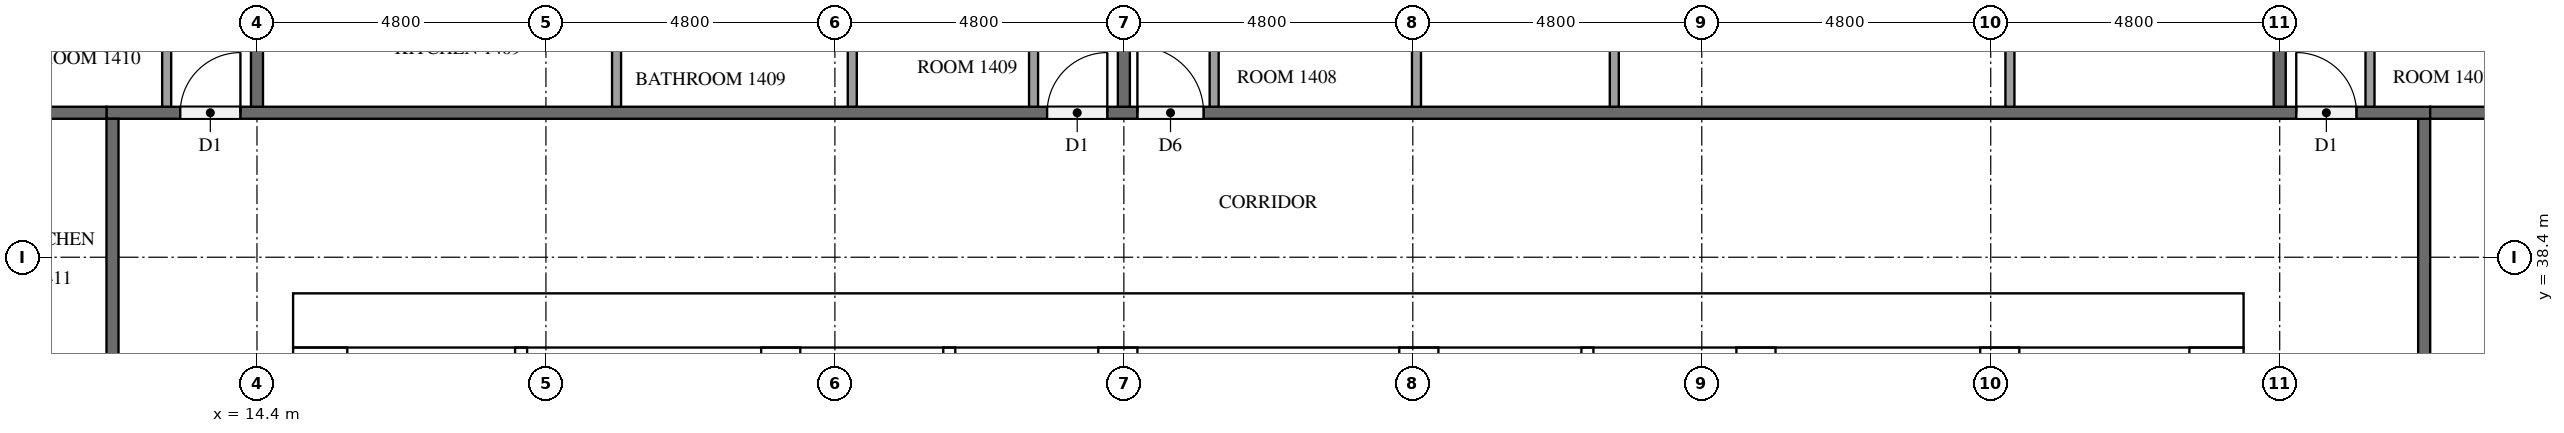
"""IFC4 building model, lengths in metres.
Left out: names, types, materials, properties, quantities, classifications, styles, units other than length and angle.
Written with IfcOpenShell. Run it as: python <this file> out.ifc"""

import sys

from ifc_helpers import new_model, si_unit, direction, frame, frame_2d, origin, place, context, subcontext, project, spatial, rectangle, extrude, element, fill, save


model = new_model("IFC4")
c1 = context("Model", 3, precision=1e-05, world=origin(), true_north=direction((0.0, 1.0)))
c2 = subcontext(c1, "Body", "Model", "MODEL_VIEW")
j1 = project(units=[si_unit("LENGTHUNIT", "METRE"), si_unit("PLANEANGLEUNIT", "RADIAN")], contexts=[c1])
p1 = place(None, origin())
s1 = spatial("IfcSite", under=j1, at=p1, CompositionType="ELEMENT")
p2 = place(p1, origin())
s2 = spatial("IfcBuilding", under=s1, at=p2, CompositionType="ELEMENT")
p3 = place(p2, frame((0.0, 0.0, 59.3)))
s3 = spatial("IfcBuildingStorey", under=s2, at=p3, CompositionType="ELEMENT", Elevation=59.3)
p4 = place(p3, frame((15.0, 37.35, 0.0), z_axis=(0.0, 0.0, 1.0), x_axis=(1.0, 0.0, 0.0)))
e1 = element("IfcWall", 1, at=p4, inside=s3, PredefinedType="SHEAR", context=c2, shape_type="SweptSolid", body=[
    extrude(rectangle(XDim=32.4, YDim=0.9, at=frame_2d((16.2, 0.0))), origin(), (0.0, 0.0, 1.0), 3.2),
])
p5 = place(p4, frame((15.3, 0.0, 0.0)))
e2 = element("IfcOpeningElement", 2, at=p5, cuts=e1, PredefinedType="OPENING", context=c2, shape_type="SweptSolid", body=[
    extrude(rectangle(XDim=1.8, YDim=2.1, at=frame_2d((0.9, 1.05))), frame((0.0, 0.46, 0.0), z_axis=(0.0, -1.0, 0.0), x_axis=(1.0, 0.0, 0.0)), (0.0, 0.0, 1.0), 0.92),
])
p6 = place(p4, frame((1.794, 0.0, 0.0)))
e3 = element("IfcOpeningElement", 3, at=p6, cuts=e1, PredefinedType="OPENING", context=c2, shape_type="SweptSolid", body=[
    extrude(rectangle(XDim=1.0, YDim=2.1, at=frame_2d((0.5, 1.05))), frame((0.0, 0.46, 0.0), z_axis=(0.0, -1.0, 0.0), x_axis=(1.0, 0.0, 0.0)), (0.0, 0.0, 1.0), 0.92),
])
p7 = place(p4, frame((5.331, 0.0, 0.0)))
e4 = element("IfcOpeningElement", 4, at=p7, cuts=e1, PredefinedType="OPENING", context=c2, shape_type="SweptSolid", body=[
    extrude(rectangle(XDim=1.0, YDim=2.1, at=frame_2d((0.5, 1.05))), frame((0.0, 0.46, 0.0), z_axis=(0.0, -1.0, 0.0), x_axis=(1.0, 0.0, 0.0)), (0.0, 0.0, 1.0), 0.92),
])
p8 = place(p3, frame((15.45, 15.9, 0.0), z_axis=(0.0, 0.0, 1.0), x_axis=(0.0, 1.0, 0.0)))
e5 = element("IfcWall", 5, at=p8, inside=s3, PredefinedType="SHEAR", context=c2, shape_type="SweptSolid", body=[
    extrude(rectangle(XDim=21.0, YDim=0.9, at=frame_2d((10.5, 0.0))), origin(), (0.0, 0.0, 1.0), 3.2),
])
p9 = place(p8, frame((4.86, 0.0, 0.0)))
e6 = element("IfcOpeningElement", 6, at=p9, cuts=e5, PredefinedType="OPENING", context=c2, shape_type="SweptSolid", body=[
    extrude(rectangle(XDim=1.2, YDim=2.1, at=frame_2d((0.6, 1.05))), frame((0.0, 0.46, 0.0), z_axis=(0.0, -1.0, 0.0), x_axis=(1.0, 0.0, 0.0)), (0.0, 0.0, 1.0), 0.92),
])
p10 = place(p3, frame((46.95, 15.9, 0.0), z_axis=(0.0, 0.0, 1.0), x_axis=(0.0, 1.0, 0.0)))
e7 = element("IfcWall", 7, at=p10, inside=s3, PredefinedType="SHEAR", context=c2, shape_type="SweptSolid", body=[
    extrude(rectangle(XDim=21.0, YDim=0.9, at=frame_2d((10.5, 0.0))), origin(), (0.0, 0.0, 1.0), 3.2),
])
p11 = place(p10, frame((10.2, 0.0, 0.0)))
e8 = element("IfcOpeningElement", 8, at=p11, cuts=e7, PredefinedType="OPENING", context=c2, shape_type="SweptSolid", body=[
    extrude(rectangle(XDim=1.2, YDim=2.1, at=frame_2d((0.6, 1.05))), frame((0.0, 0.46, 0.0), z_axis=(0.0, -1.0, 0.0), x_axis=(1.0, 0.0, 0.0)), (0.0, 0.0, 1.0), 0.92),
])
p12 = place(p3, frame((23.1, 15.9, 0.0), z_axis=(0.0, 0.0, 1.0), x_axis=(0.0, 1.0, 0.0)))
e9 = element("IfcWall", 9, at=p12, inside=s3, PredefinedType="SHEAR", context=c2, shape_type="SweptSolid", body=[
    extrude(rectangle(XDim=21.0, YDim=0.65, at=frame_2d((10.5, 0.0))), origin(), (0.0, 0.0, 1.0), 3.2),
])
p13 = place(p3, frame((39.3, 27.75, 0.0), z_axis=(0.0, 0.0, 1.0), x_axis=(0.0, 1.0, 0.0)))
e10 = element("IfcWall", 10, at=p13, inside=s3, PredefinedType="SHEAR", context=c2, shape_type="SweptSolid", body=[
    extrude(rectangle(XDim=9.15, YDim=0.65, at=frame_2d((4.575, 0.0))), origin(), (0.0, 0.0, 1.0), 3.2),
])
p14 = place(p3, frame((43.35, 27.75, 0.0), z_axis=(0.0, 0.0, 1.0), x_axis=(0.0, 1.0, 0.0)))
e11 = element("IfcWall", 11, at=p14, inside=s3, PredefinedType="SHEAR", context=c2, shape_type="SweptSolid", body=[
    extrude(rectangle(XDim=9.15, YDim=0.65, at=frame_2d((4.575, 0.0))), origin(), (0.0, 0.0, 1.0), 3.2),
])
p15 = place(p14, frame((7.65, 0.0, 0.0)))
e12 = element("IfcOpeningElement", 12, at=p15, cuts=e11, PredefinedType="OPENING", context=c2, shape_type="SweptSolid", body=[
    extrude(rectangle(XDim=1.2, YDim=2.1, at=frame_2d((0.6, 1.05))), frame((0.0, 0.335, 0.0), z_axis=(0.0, -1.0, 0.0), x_axis=(1.0, 0.0, 0.0)), (0.0, 0.0, 1.0), 0.67),
])
for number, where, z_axis, x_axis in (
    (13, (28.7, 33.875, 0.0), (0.0, 0.0, 1.0), (0.0, 1.0, 0.0)),
    (14, (33.7, 33.875, 0.0), (0.0, 0.0, 1.0), (0.0, 1.0, 0.0)),
):
    element("IfcWall", number, at=place(p3, frame(where, z_axis=z_axis, x_axis=x_axis)), inside=s3, PredefinedType="SHEAR", context=c2, shape_type="SweptSolid", body=[
        extrude(rectangle(XDim=3.025, YDim=0.65, at=frame_2d((1.512, 0.0))), origin(), (0.0, 0.0, 1.0), 3.2),
    ])
for number, where, z_axis, x_axis in (
    (15, (25.9, 33.875, 0.0), (0.0, 0.0, 1.0), (0.0, 1.0, 0.0)),
    (16, (36.5, 33.875, 0.0), (0.0, 0.0, 1.0), (0.0, 1.0, 0.0)),
):
    element("IfcWall", number, at=place(p3, frame(where, z_axis=z_axis, x_axis=x_axis)), inside=s3, PredefinedType="SOLIDWALL", context=c2, shape_type="SweptSolid", body=[
        extrude(rectangle(XDim=3.025, YDim=0.2, at=frame_2d((1.512, 0.0))), origin(), (0.0, 0.0, 1.0), 3.2),
    ])
p16 = place(p3, frame((18.788, 31.575, 0.0), z_axis=(0.0, 0.0, 1.0), x_axis=(0.0, 1.0, 0.0)))
e17 = element("IfcWall", 17, at=p16, inside=s3, PredefinedType="PARTITIONING", context=c2, shape_type="SweptSolid", body=[
    extrude(rectangle(XDim=5.325, YDim=0.2, at=frame_2d((2.663, 0.0))), origin(), (0.0, 0.0, 1.0), 3.2),
])
p17 = place(p3, frame((50.4, 40.7, 0.0), z_axis=(0.0, 0.0, 1.0), x_axis=(0.0, -1.0, 0.0)))
e18 = element("IfcWall", 18, at=p17, inside=s3, PredefinedType="PARTITIONING", context=c2, shape_type="SweptSolid", body=[
    extrude(rectangle(XDim=28.6, YDim=0.2, at=frame_2d((14.3, 0.0))), origin(), (0.0, 0.0, 1.0), 3.2),
])
p18 = place(p17, frame((24.175, 0.0, 0.0)))
e19 = element("IfcOpeningElement", 19, at=p18, cuts=e18, PredefinedType="OPENING", context=c2, shape_type="SweptSolid", body=[
    extrude(rectangle(XDim=1.0, YDim=2.1, at=frame_2d((0.5, 1.05))), frame((0.0, 0.11, 0.0), z_axis=(0.0, -1.0, 0.0), x_axis=(1.0, 0.0, 0.0)), (0.0, 0.0, 1.0), 0.22),
])
p19 = place(p17, frame((22.625, 0.0, 0.0)))
e20 = element("IfcOpeningElement", 20, at=p19, cuts=e18, PredefinedType="OPENING", context=c2, shape_type="SweptSolid", body=[
    extrude(rectangle(XDim=1.0, YDim=2.1, at=frame_2d((0.5, 1.05))), frame((0.0, 0.11, 0.0), z_axis=(0.0, -1.0, 0.0), x_axis=(1.0, 0.0, 0.0)), (0.0, 0.0, 1.0), 0.22),
])
p20 = place(p17, frame((10.625, 0.0, 0.0)))
e21 = element("IfcOpeningElement", 21, at=p20, cuts=e18, PredefinedType="OPENING", context=c2, shape_type="SweptSolid", body=[
    extrude(rectangle(XDim=1.0, YDim=2.1, at=frame_2d((0.5, 1.05))), frame((0.0, 0.11, 0.0), z_axis=(0.0, -1.0, 0.0), x_axis=(1.0, 0.0, 0.0)), (0.0, 0.0, 1.0), 0.22),
])
p21 = place(p3, frame((11.9, 40.8, 0.0), z_axis=(0.0, 0.0, 1.0), x_axis=(1.0, 0.0, 0.0)))
e22 = element("IfcWall", 22, at=p21, inside=s3, PredefinedType="PARTITIONING", context=c2, shape_type="SweptSolid", body=[
    extrude(rectangle(XDim=38.6, YDim=0.2, at=frame_2d((19.3, 0.0))), origin(), (0.0, 0.0, 1.0), 3.2),
])
p22 = place(p21, frame((36.375, 0.0, 0.0)))
e23 = element("IfcOpeningElement", 23, at=p22, cuts=e22, PredefinedType="OPENING", context=c2, shape_type="SweptSolid", body=[
    extrude(rectangle(XDim=1.0, YDim=2.1, at=frame_2d((0.5, 1.05))), frame((0.0, 0.11, 0.0), z_axis=(0.0, -1.0, 0.0), x_axis=(1.0, 0.0, 0.0)), (0.0, 0.0, 1.0), 0.22),
])
p23 = place(p21, frame((17.125, 0.0, 0.0)))
e24 = element("IfcOpeningElement", 24, at=p23, cuts=e22, PredefinedType="OPENING", context=c2, shape_type="SweptSolid", body=[
    extrude(rectangle(XDim=1.1, YDim=2.1, at=frame_2d((0.55, 1.05))), frame((0.0, 0.11, 0.0), z_axis=(0.0, -1.0, 0.0), x_axis=(1.0, 0.0, 0.0)), (0.0, 0.0, 1.0), 0.22),
])
p24 = place(p21, frame((15.625, 0.0, 0.0)))
e25 = element("IfcOpeningElement", 25, at=p24, cuts=e22, PredefinedType="OPENING", context=c2, shape_type="SweptSolid", body=[
    extrude(rectangle(XDim=1.0, YDim=2.1, at=frame_2d((0.5, 1.05))), frame((0.0, 0.11, 0.0), z_axis=(0.0, -1.0, 0.0), x_axis=(1.0, 0.0, 0.0)), (0.0, 0.0, 1.0), 0.22),
])
p25 = place(p21, frame((1.225, 0.0, 0.0)))
e26 = element("IfcOpeningElement", 26, at=p25, cuts=e22, PredefinedType="OPENING", context=c2, shape_type="SweptSolid", body=[
    extrude(rectangle(XDim=1.0, YDim=2.1, at=frame_2d((0.5, 1.05))), frame((0.0, 0.11, 0.0), z_axis=(0.0, -1.0, 0.0), x_axis=(1.0, 0.0, 0.0)), (0.0, 0.0, 1.0), 0.22),
])
p26 = place(p3, frame((12.0, 12.1, 0.0), z_axis=(0.0, 0.0, 1.0), x_axis=(0.0, 1.0, 0.0)))
e27 = element("IfcWall", 27, at=p26, inside=s3, PredefinedType="PARTITIONING", context=c2, shape_type="SweptSolid", body=[
    extrude(rectangle(XDim=28.6, YDim=0.2, at=frame_2d((14.3, 0.0))), origin(), (0.0, 0.0, 1.0), 3.2),
])
p27 = place(p26, frame((19.375, 0.0, 0.0)))
e28 = element("IfcOpeningElement", 28, at=p27, cuts=e27, PredefinedType="OPENING", context=c2, shape_type="SweptSolid", body=[
    extrude(rectangle(XDim=1.0, YDim=2.1, at=frame_2d((0.5, 1.05))), frame((0.0, 0.11, 0.0), z_axis=(0.0, -1.0, 0.0), x_axis=(1.0, 0.0, 0.0)), (0.0, 0.0, 1.0), 0.22),
])
p28 = place(p26, frame((12.175, 0.0, 0.0)))
e29 = element("IfcOpeningElement", 29, at=p28, cuts=e27, PredefinedType="OPENING", context=c2, shape_type="SweptSolid", body=[
    extrude(rectangle(XDim=1.0, YDim=2.1, at=frame_2d((0.5, 1.05))), frame((0.0, 0.11, 0.0), z_axis=(0.0, -1.0, 0.0), x_axis=(1.0, 0.0, 0.0)), (0.0, 0.0, 1.0), 0.22),
])
p29 = place(p26, frame((2.575, 0.0, 0.0)))
e30 = element("IfcOpeningElement", 30, at=p29, cuts=e27, PredefinedType="OPENING", context=c2, shape_type="SweptSolid", body=[
    extrude(rectangle(XDim=1.0, YDim=2.1, at=frame_2d((0.5, 1.05))), frame((0.0, 0.11, 0.0), z_axis=(0.0, -1.0, 0.0), x_axis=(1.0, 0.0, 0.0)), (0.0, 0.0, 1.0), 0.22),
])
p30 = place(p26, frame((1.025, 0.0, 0.0)))
e31 = element("IfcOpeningElement", 31, at=p30, cuts=e27, PredefinedType="OPENING", context=c2, shape_type="SweptSolid", body=[
    extrude(rectangle(XDim=1.0, YDim=2.1, at=frame_2d((0.5, 1.05))), frame((0.0, 0.11, 0.0), z_axis=(0.0, -1.0, 0.0), x_axis=(1.0, 0.0, 0.0)), (0.0, 0.0, 1.0), 0.22),
])
p31 = place(p3, frame((50.5, 40.8, 0.0), z_axis=(0.0, 0.0, 1.0), x_axis=(1.0, 0.0, 0.0)))
e32 = element("IfcWall", 32, at=p31, inside=s3, PredefinedType="PARTITIONING", context=c2, shape_type="SweptSolid", body=[
    extrude(rectangle(XDim=11.8, YDim=0.2, at=frame_2d((5.9, 0.0))), origin(), (0.0, 0.0, 1.0), 3.2),
])
for number, where, z_axis, x_axis in (
    (33, (48.0, 47.575, 0.0), (0.0, 0.0, 1.0), (0.0, -1.0, 0.0)),
    (34, (28.8, 47.575, 0.0), (0.0, 0.0, 1.0), (0.0, -1.0, 0.0)),
):
    element("IfcWall", number, at=place(p3, frame(where, z_axis=z_axis, x_axis=x_axis)), inside=s3, PredefinedType="PARTITIONING", context=c2, shape_type="SweptSolid", body=[
        extrude(rectangle(XDim=6.675, YDim=0.2, at=frame_2d((3.337, 0.0))), origin(), (0.0, 0.0, 1.0), 3.2),
    ])
for number, where, z_axis, x_axis in (
    (35, (14.4, 47.9, 0.0), (0.0, 0.0, 1.0), (0.0, -1.0, 0.0)),
    (36, (4.9, 40.8, 0.0), (0.0, 0.0, 1.0), (1.0, 0.0, 0.0)),
):
    element("IfcWall", number, at=place(p3, frame(where, z_axis=z_axis, x_axis=x_axis)), inside=s3, PredefinedType="PARTITIONING", context=c2, shape_type="SweptSolid", body=[
        extrude(rectangle(XDim=7.0, YDim=0.2, at=frame_2d((3.5, 0.0))), origin(), (0.0, 0.0, 1.0), 3.2),
    ])
p32 = place(p3, frame((49.5, 40.9, 0.0), z_axis=(0.0, 0.0, 1.0), x_axis=(0.0, 1.0, 0.0)))
e37 = element("IfcWall", 37, at=p32, inside=s3, PredefinedType="PARTITIONING", context=c2, shape_type="SweptSolid", body=[
    extrude(rectangle(XDim=1.925, YDim=0.15, at=frame_2d((0.962, 0.0))), origin(), (0.0, 0.0, 1.0), 3.2),
])
for number, where, z_axis, x_axis in (
    (38, (33.661, 40.9, 0.0), (0.0, 0.0, 1.0), (0.0, 1.0, 0.0)),
    (39, (36.947, 40.9, 0.0), (0.0, 0.0, 1.0), (0.0, 1.0, 0.0)),
    (40, (43.519, 40.9, 0.0), (0.0, 0.0, 1.0), (0.0, 1.0, 0.0)),
):
    element("IfcWall", number, at=place(p3, frame(where, z_axis=z_axis, x_axis=x_axis)), inside=s3, PredefinedType="PARTITIONING", context=c2, shape_type="SweptSolid", body=[
        extrude(rectangle(XDim=2.375, YDim=0.15, at=frame_2d((1.188, 0.0))), origin(), (0.0, 0.0, 1.0), 3.2),
    ])
p33 = place(p3, frame((30.3, 40.9, 0.0), z_axis=(0.0, 0.0, 1.0), x_axis=(0.0, 1.0, 0.0)))
e41 = element("IfcWall", 41, at=p33, inside=s3, PredefinedType="PARTITIONING", context=c2, shape_type="SweptSolid", body=[
    extrude(rectangle(XDim=2.525, YDim=0.15, at=frame_2d((1.263, 0.0))), origin(), (0.0, 0.0, 1.0), 3.2),
])
for number, where, z_axis, x_axis in (
    (42, (24.289, 40.9, 0.0), (0.0, 0.0, 1.0), (0.0, 1.0, 0.0)),
    (43, (20.373, 40.9, 0.0), (0.0, 0.0, 1.0), (0.0, 1.0, 0.0)),
):
    element("IfcWall", number, at=place(p3, frame(where, z_axis=z_axis, x_axis=x_axis)), inside=s3, PredefinedType="PARTITIONING", context=c2, shape_type="SweptSolid", body=[
        extrude(rectangle(XDim=1.775, YDim=0.15, at=frame_2d((0.888, 0.0))), origin(), (0.0, 0.0, 1.0), 3.2),
    ])
for number, where, z_axis, x_axis in (
    (44, (27.3, 40.9, 0.0), (0.0, 0.0, 1.0), (0.0, 1.0, 0.0)),
    (45, (12.9, 40.9, 0.0), (0.0, 0.0, 1.0), (0.0, 1.0, 0.0)),
):
    element("IfcWall", number, at=place(p3, frame(where, z_axis=z_axis, x_axis=x_axis)), inside=s3, PredefinedType="PARTITIONING", context=c2, shape_type="SweptSolid", body=[
        extrude(rectangle(XDim=1.925, YDim=0.15, at=frame_2d((0.962, 0.0))), origin(), (0.0, 0.0, 1.0), 3.2),
    ])
p34 = place(p5, origin())
e46 = element("IfcDoor", 46, at=p34, inside=s3, OperationType="DOUBLE_DOOR_SINGLE_SWING", PredefinedType="DOOR", context=c2, shape_type="SweptSolid", body=[
    extrude(rectangle(XDim=1.8, YDim=2.1, at=frame_2d((0.9, 1.05))), frame((0.0, 0.025, 0.0), z_axis=(0.0, -1.0, 0.0), x_axis=(1.0, 0.0, 0.0)), (0.0, 0.0, 1.0), 0.05),
])
fill(e2, e46)
p35 = place(p6, origin())
e47 = element("IfcDoor", 47, at=p35, inside=s3, OperationType="SINGLE_SWING_LEFT", PredefinedType="DOOR", context=c2, shape_type="SweptSolid", body=[
    extrude(rectangle(XDim=1.0, YDim=2.1, at=frame_2d((0.5, 1.05))), frame((0.0, 0.025, 0.0), z_axis=(0.0, -1.0, 0.0), x_axis=(1.0, 0.0, 0.0)), (0.0, 0.0, 1.0), 0.05),
])
fill(e3, e47)
p36 = place(p7, origin())
e48 = element("IfcDoor", 48, at=p36, inside=s3, OperationType="SINGLE_SWING_RIGHT", PredefinedType="DOOR", context=c2, shape_type="SweptSolid", body=[
    extrude(rectangle(XDim=1.0, YDim=2.1, at=frame_2d((0.5, 1.05))), frame((0.0, 0.025, 0.0), z_axis=(0.0, -1.0, 0.0), x_axis=(1.0, 0.0, 0.0)), (0.0, 0.0, 1.0), 0.05),
])
fill(e4, e48)
p37 = place(p22, origin())
e49 = element("IfcDoor", 49, at=p37, inside=s3, OperationType="SINGLE_SWING_LEFT", PredefinedType="DOOR", context=c2, shape_type="SweptSolid", body=[
    extrude(rectangle(XDim=1.0, YDim=2.1, at=frame_2d((0.5, 1.05))), frame((0.0, 0.025, 0.0), z_axis=(0.0, -1.0, 0.0), x_axis=(1.0, 0.0, 0.0)), (0.0, 0.0, 1.0), 0.05),
])
fill(e23, e49)
p38 = place(p23, origin())
e50 = element("IfcDoor", 50, at=p38, inside=s3, OperationType="SINGLE_SWING_LEFT", PredefinedType="DOOR", context=c2, shape_type="SweptSolid", body=[
    extrude(rectangle(XDim=1.1, YDim=2.1, at=frame_2d((0.55, 1.05))), frame((0.0, 0.025, 0.0), z_axis=(0.0, -1.0, 0.0), x_axis=(1.0, 0.0, 0.0)), (0.0, 0.0, 1.0), 0.05),
])
fill(e24, e50)
p39 = place(p24, origin())
e51 = element("IfcDoor", 51, at=p39, inside=s3, OperationType="SINGLE_SWING_RIGHT", PredefinedType="DOOR", context=c2, shape_type="SweptSolid", body=[
    extrude(rectangle(XDim=1.0, YDim=2.1, at=frame_2d((0.5, 1.05))), frame((0.0, 0.025, 0.0), z_axis=(0.0, -1.0, 0.0), x_axis=(1.0, 0.0, 0.0)), (0.0, 0.0, 1.0), 0.05),
])
fill(e25, e51)
p40 = place(p25, origin())
e52 = element("IfcDoor", 52, at=p40, inside=s3, OperationType="SINGLE_SWING_RIGHT", PredefinedType="DOOR", context=c2, shape_type="SweptSolid", body=[
    extrude(rectangle(XDim=1.0, YDim=2.1, at=frame_2d((0.5, 1.05))), frame((0.0, 0.025, 0.0), z_axis=(0.0, -1.0, 0.0), x_axis=(1.0, 0.0, 0.0)), (0.0, 0.0, 1.0), 0.05),
])
fill(e26, e52)
save(model, sys.argv[1])
